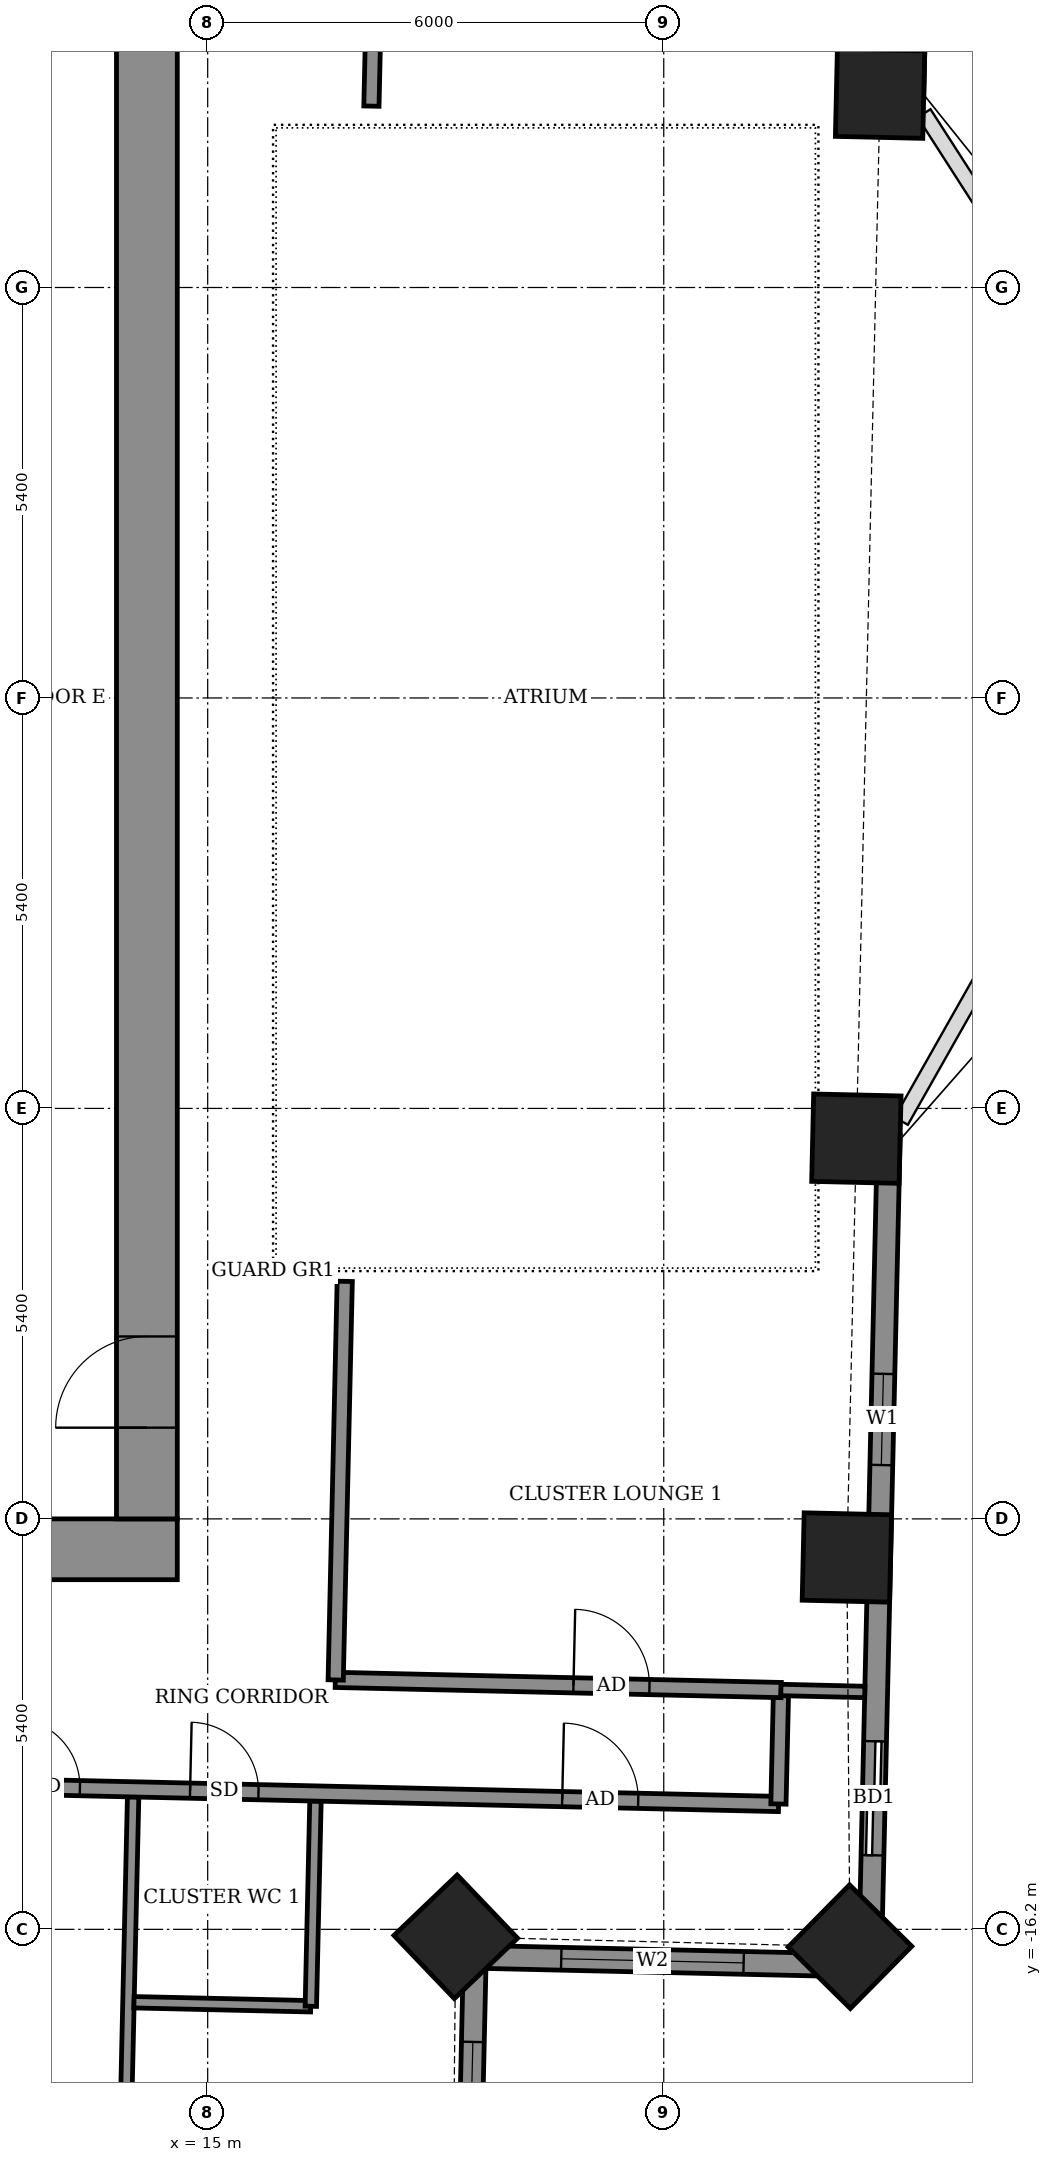
"""IFC4 building model, lengths in metres.
Left out: names, types, materials, properties, quantities, classifications, styles, units other than length and angle.
Written with IfcOpenShell. Run it as: python <this file> out.ifc"""

import sys

from ifc_helpers import new_model, si_unit, direction, frame, frame_2d, origin, origin_2d, place, context, subcontext, project, spatial, rectangle, extrude, element, fill, save


model = new_model("IFC4")
c1 = context("Model", 3, precision=1e-05, world=origin(), true_north=direction((0.0, 1.0)))
c2 = subcontext(c1, "Body", "Model", "MODEL_VIEW")
j1 = project(units=[si_unit("LENGTHUNIT", "METRE"), si_unit("PLANEANGLEUNIT", "RADIAN")], contexts=[c1])
p1 = place(None, origin())
s1 = spatial("IfcSite", under=j1, at=p1, CompositionType="ELEMENT")
p2 = place(p1, origin())
s2 = spatial("IfcBuilding", under=s1, at=p2, CompositionType="ELEMENT")
p3 = place(p2, frame((0.0, 0.0, 201.5)))
s3 = spatial("IfcBuildingStorey", under=s2, at=p3, CompositionType="ELEMENT", Elevation=201.5)
for number, where, z_axis, x_axis in (
    (1, (18.264, -16.298, -0.55), (0.0, 0.0, 1.0), (0.723, 0.691, 0.0)),
    (2, (23.45, -16.428, -0.55), (0.0, 0.0, 1.0), (0.702, 0.712, 0.0)),
    (3, (23.409, -11.308, -0.55), (0.0, 0.0, 1.0), (0.023, 1.0, 0.0)),
    (4, (23.534, -5.798, -0.55), (0.0, 0.0, 1.0), (0.023, 1.0, 0.0)),
    (5, (23.846, 7.95, -0.55), (0.0, 0.0, 1.0), (0.023, 1.0, 0.0)),
):
    element("IfcColumn", number, at=place(p3, frame(where, z_axis=z_axis, x_axis=x_axis)), inside=s3, PredefinedType="COLUMN", context=c2, shape_type="SweptSolid", body=[
        extrude(rectangle(XDim=1.15, YDim=1.15, at=origin_2d()), origin(), (0.0, 0.0, 1.0), 3.6),
    ])
p4 = place(p3, frame((23.713, -16.679, 0.0), z_axis=(0.0, 0.0, 1.0), x_axis=(0.02269451316, 0.999742446369, 0.0)))
e6 = element("IfcWall", 6, at=p4, inside=s3, PredefinedType="SOLIDWALL", context=c2, shape_type="SweptSolid", body=[
    extrude(rectangle(XDim=10.93, YDim=0.3, at=frame_2d((5.465, 0.0))), origin(), (0.0, 0.0, 1.0), 2.55),
])
p5 = place(p4, frame((1.454, 0.0, 0.0)))
e7 = element("IfcOpeningElement", 7, at=p5, cuts=e6, PredefinedType="OPENING", context=c2, shape_type="SweptSolid", body=[
    extrude(rectangle(XDim=1.5, YDim=2.4, at=frame_2d((0.75, 1.2))), frame((0.0, 0.16, 0.0), z_axis=(0.0, -1.0, 0.0), x_axis=(1.0, 0.0, 0.0)), (0.0, 0.0, 1.0), 0.32),
])
p6 = place(p4, frame((6.589, 0.0, 0.9)))
e8 = element("IfcOpeningElement", 8, at=p6, cuts=e6, PredefinedType="OPENING", context=c2, shape_type="SweptSolid", body=[
    extrude(rectangle(XDim=1.2, YDim=1.5, at=frame_2d((0.6, 0.75))), frame((0.0, 0.16, 0.0), z_axis=(0.0, -1.0, 0.0), x_axis=(1.0, 0.0, 0.0)), (0.0, 0.0, 1.0), 0.32),
])
p7 = place(p3, frame((24.27, 7.885, 0.0), z_axis=(0.0, 0.0, 1.0), x_axis=(0.022715362207, 0.999741972871, 0.0)))
e9 = element("IfcWall", 9, at=p7, inside=s3, PredefinedType="SOLIDWALL", context=c2, shape_type="SweptSolid", body=[
    extrude(rectangle(XDim=11.93, YDim=0.3, at=frame_2d((5.965, 0.0))), origin(), (0.0, 0.0, 1.0), 3.05),
])
p8 = place(p7, frame((2.311, 0.0, 0.0)))
e10 = element("IfcOpeningElement", 10, at=p8, cuts=e9, PredefinedType="OPENING", context=c2, shape_type="SweptSolid", body=[
    extrude(rectangle(XDim=1.5, YDim=2.4, at=frame_2d((0.75, 1.2))), frame((0.0, 0.16, 0.0), z_axis=(0.0, -1.0, 0.0), x_axis=(1.0, 0.0, 0.0)), (0.0, 0.0, 1.0), 0.32),
])
p9 = place(p7, frame((7.703, 0.0, 0.9)))
e11 = element("IfcOpeningElement", 11, at=p9, cuts=e9, PredefinedType="OPENING", context=c2, shape_type="SweptSolid", body=[
    extrude(rectangle(XDim=0.9, YDim=1.5, at=frame_2d((0.45, 0.75))), frame((0.0, 0.16, 0.0), z_axis=(0.0, -1.0, 0.0), x_axis=(1.0, 0.0, 0.0)), (0.0, 0.0, 1.0), 0.32),
])
p10 = place(p7, frame((9.426, 0.0, 0.9)))
e12 = element("IfcOpeningElement", 12, at=p10, cuts=e9, PredefinedType="OPENING", context=c2, shape_type="SweptSolid", body=[
    extrude(rectangle(XDim=1.2, YDim=1.5, at=frame_2d((0.6, 0.75))), frame((0.0, 0.16, 0.0), z_axis=(0.0, -1.0, 0.0), x_axis=(1.0, 0.0, 0.0)), (0.0, 0.0, 1.0), 0.32),
])
p11 = place(p3, frame((18.396, -21.76, 0.0), z_axis=(0.0, 0.0, 1.0), x_axis=(0.022675548694, 0.99974287669, 0.0)))
e13 = element("IfcWall", 13, at=p11, inside=s3, PredefinedType="SOLIDWALL", context=c2, shape_type="SweptSolid", body=[
    extrude(rectangle(XDim=5.2, YDim=0.3, at=frame_2d((2.6, 0.0))), origin(), (0.0, 0.0, 1.0), 2.55),
])
p12 = place(p11, frame((1.68, 0.0, 0.9)))
e14 = element("IfcOpeningElement", 14, at=p12, cuts=e13, PredefinedType="OPENING", context=c2, shape_type="SweptSolid", body=[
    extrude(rectangle(XDim=2.4, YDim=1.5, at=frame_2d((1.2, 0.75))), frame((0.0, 0.16, 0.0), z_axis=(0.0, -1.0, 0.0), x_axis=(1.0, 0.0, 0.0)), (0.0, 0.0, 1.0), 0.32),
])
p13 = place(p3, frame((18.514, -16.561, 0.0), z_axis=(0.0, 0.0, 1.0), x_axis=(0.99974287669, -0.022675548694, 0.0)))
e15 = element("IfcWall", 15, at=p13, inside=s3, PredefinedType="SOLIDWALL", context=c2, shape_type="SweptSolid", body=[
    extrude(rectangle(XDim=5.2, YDim=0.3, at=frame_2d((2.6, 0.0))), origin(), (0.0, 0.0, 1.0), 2.55),
])
p14 = place(p13, frame((1.138, 0.0, 0.9)))
e16 = element("IfcOpeningElement", 16, at=p14, cuts=e15, PredefinedType="OPENING", context=c2, shape_type="SweptSolid", body=[
    extrude(rectangle(XDim=2.4, YDim=1.5, at=frame_2d((1.2, 0.75))), frame((0.0, 0.16, 0.0), z_axis=(0.0, -1.0, 0.0), x_axis=(1.0, 0.0, 0.0)), (0.0, 0.0, 1.0), 0.32),
])
p15 = place(p3, frame((13.859, -21.507, 0.0), z_axis=(0.0, 0.0, 1.0), x_axis=(0.022714326521, 0.999741996402, 0.0)))
e17 = element("IfcWall", 17, at=p15, inside=s3, PredefinedType="PARTITIONING", context=c2, shape_type="SweptSolid", body=[
    extrude(rectangle(XDim=7.051, YDim=0.15, at=frame_2d((3.525, 0.0))), origin(), (0.0, 0.0, 1.0), 2.55),
])
p16 = place(p3, frame((14.03, -17.159, 0.0), z_axis=(0.0, 0.0, 1.0), x_axis=(0.999740478815, -0.022781023197, 0.0)))
e18 = element("IfcWall", 18, at=p16, inside=s3, PredefinedType="PARTITIONING", context=c2, shape_type="SweptSolid", body=[
    extrude(rectangle(XDim=2.325, YDim=0.15, at=frame_2d((1.163, 0.0))), origin(), (0.0, 0.0, 1.0), 3.05),
])
p17 = place(p3, frame((16.357, -17.212, 0.0), z_axis=(0.0, 0.0, 1.0), x_axis=(0.02260842146, 0.999744396973, 0.0)))
e19 = element("IfcWall", 19, at=p17, inside=s3, PredefinedType="PARTITIONING", context=c2, shape_type="SweptSolid", body=[
    extrude(rectangle(XDim=2.7, YDim=0.15, at=frame_2d((1.35, 0.0))), origin(), (0.0, 0.0, 1.0), 3.05),
])
p18 = place(p3, frame((-26.421, -13.441, 0.0), z_axis=(0.0, 0.0, 1.0), x_axis=(0.999742754064, -0.022680954485, 0.0)))
e20 = element("IfcWall", 20, at=p18, inside=s3, PredefinedType="PARTITIONING", context=c2, shape_type="SweptSolid", body=[
    extrude(rectangle(XDim=48.945, YDim=0.2, at=frame_2d((24.472, 0.0))), origin(), (0.0, 0.0, 1.0), 3.05),
])
p19 = place(p18, frame((1.375, 0.0, 0.0)))
e21 = element("IfcOpeningElement", 21, at=p19, cuts=e20, PredefinedType="OPENING", context=c2, shape_type="SweptSolid", body=[
    extrude(rectangle(XDim=1.0, YDim=2.1, at=frame_2d((0.5, 1.05))), frame((0.0, 0.11, 0.0), z_axis=(0.0, -1.0, 0.0), x_axis=(1.0, 0.0, 0.0)), (0.0, 0.0, 1.0), 0.22),
])
p20 = place(p18, frame((6.0, 0.0, 0.0)))
e22 = element("IfcOpeningElement", 22, at=p20, cuts=e20, PredefinedType="OPENING", context=c2, shape_type="SweptSolid", body=[
    extrude(rectangle(XDim=0.9, YDim=2.1, at=frame_2d((0.45, 1.05))), frame((0.0, 0.11, 0.0), z_axis=(0.0, -1.0, 0.0), x_axis=(1.0, 0.0, 0.0)), (0.0, 0.0, 1.0), 0.22),
])
p21 = place(p18, frame((10.775, 0.0, 0.0)))
e23 = element("IfcOpeningElement", 23, at=p21, cuts=e20, PredefinedType="OPENING", context=c2, shape_type="SweptSolid", body=[
    extrude(rectangle(XDim=0.9, YDim=2.1, at=frame_2d((0.45, 1.05))), frame((0.0, 0.11, 0.0), z_axis=(0.0, -1.0, 0.0), x_axis=(1.0, 0.0, 0.0)), (0.0, 0.0, 1.0), 0.22),
])
p22 = place(p18, frame((13.05, 0.0, 0.0)))
e24 = element("IfcOpeningElement", 24, at=p22, cuts=e20, PredefinedType="OPENING", context=c2, shape_type="SweptSolid", body=[
    extrude(rectangle(XDim=0.9, YDim=2.1, at=frame_2d((0.45, 1.05))), frame((0.0, 0.11, 0.0), z_axis=(0.0, -1.0, 0.0), x_axis=(1.0, 0.0, 0.0)), (0.0, 0.0, 1.0), 0.22),
])
p23 = place(p18, frame((20.275, 0.0, 0.0)))
e25 = element("IfcOpeningElement", 25, at=p23, cuts=e20, PredefinedType="OPENING", context=c2, shape_type="SweptSolid", body=[
    extrude(rectangle(XDim=0.9, YDim=2.1, at=frame_2d((0.45, 1.05))), frame((0.0, 0.11, 0.0), z_axis=(0.0, -1.0, 0.0), x_axis=(1.0, 0.0, 0.0)), (0.0, 0.0, 1.0), 0.22),
])
p24 = place(p18, frame((22.525, 0.0, 0.0)))
e26 = element("IfcOpeningElement", 26, at=p24, cuts=e20, PredefinedType="OPENING", context=c2, shape_type="SweptSolid", body=[
    extrude(rectangle(XDim=0.9, YDim=2.1, at=frame_2d((0.45, 1.05))), frame((0.0, 0.11, 0.0), z_axis=(0.0, -1.0, 0.0), x_axis=(1.0, 0.0, 0.0)), (0.0, 0.0, 1.0), 0.22),
])
p25 = place(p18, frame((29.6, 0.0, 0.0)))
e27 = element("IfcOpeningElement", 27, at=p25, cuts=e20, PredefinedType="OPENING", context=c2, shape_type="SweptSolid", body=[
    extrude(rectangle(XDim=0.9, YDim=2.1, at=frame_2d((0.45, 1.05))), frame((0.0, 0.11, 0.0), z_axis=(0.0, -1.0, 0.0), x_axis=(1.0, 0.0, 0.0)), (0.0, 0.0, 1.0), 0.22),
])
p26 = place(p18, frame((31.875, 0.0, 0.0)))
e28 = element("IfcOpeningElement", 28, at=p26, cuts=e20, PredefinedType="OPENING", context=c2, shape_type="SweptSolid", body=[
    extrude(rectangle(XDim=0.9, YDim=2.1, at=frame_2d((0.45, 1.05))), frame((0.0, 0.11, 0.0), z_axis=(0.0, -1.0, 0.0), x_axis=(1.0, 0.0, 0.0)), (0.0, 0.0, 1.0), 0.22),
])
p27 = place(p18, frame((38.85, 0.0, 0.0)))
e29 = element("IfcOpeningElement", 29, at=p27, cuts=e20, PredefinedType="OPENING", context=c2, shape_type="SweptSolid", body=[
    extrude(rectangle(XDim=0.9, YDim=2.1, at=frame_2d((0.45, 1.05))), frame((0.0, 0.11, 0.0), z_axis=(0.0, -1.0, 0.0), x_axis=(1.0, 0.0, 0.0)), (0.0, 0.0, 1.0), 0.22),
])
p28 = place(p18, frame((46.097, 0.0, 0.0)))
e30 = element("IfcOpeningElement", 30, at=p28, cuts=e20, PredefinedType="OPENING", context=c2, shape_type="SweptSolid", body=[
    extrude(rectangle(XDim=1.0, YDim=2.1, at=frame_2d((0.5, 1.05))), frame((0.0, 0.11, 0.0), z_axis=(0.0, -1.0, 0.0), x_axis=(1.0, 0.0, 0.0)), (0.0, 0.0, 1.0), 0.22),
])
p29 = place(p18, frame((41.2, 0.0, 0.0)))
e31 = element("IfcOpeningElement", 31, at=p29, cuts=e20, PredefinedType="OPENING", context=c2, shape_type="SweptSolid", body=[
    extrude(rectangle(XDim=0.9, YDim=2.1, at=frame_2d((0.45, 1.05))), frame((0.0, 0.11, 0.0), z_axis=(0.0, -1.0, 0.0), x_axis=(1.0, 0.0, 0.0)), (0.0, 0.0, 1.0), 0.22),
])
p30 = place(p3, frame((22.509, -14.551, 0.0), z_axis=(0.0, 0.0, 1.0), x_axis=(0.022632637625, 0.99974384905, 0.0)))
e32 = element("IfcWall", 32, at=p30, inside=s3, PredefinedType="PARTITIONING", context=c2, shape_type="SweptSolid", body=[
    extrude(rectangle(XDim=1.5, YDim=0.2, at=frame_2d((0.75, 0.0))), origin(), (0.0, 0.0, 1.0), 3.05),
])
p31 = place(p3, frame((16.679, -12.918, 0.0), z_axis=(0.0, 0.0, 1.0), x_axis=(0.999739057042, -0.022843332181, 0.0)))
e33 = element("IfcWall", 33, at=p31, inside=s3, PredefinedType="PARTITIONING", context=c2, shape_type="SweptSolid", body=[
    extrude(rectangle(XDim=5.867, YDim=0.2, at=frame_2d((2.934, 0.0))), origin(), (0.0, 0.0, 1.0), 3.05),
])
p32 = place(p31, frame((3.134, 0.0, 0.0)))
e34 = element("IfcOpeningElement", 34, at=p32, cuts=e33, PredefinedType="OPENING", context=c2, shape_type="SweptSolid", body=[
    extrude(rectangle(XDim=1.0, YDim=2.1, at=frame_2d((0.5, 1.05))), frame((0.0, 0.11, 0.0), z_axis=(0.0, -1.0, 0.0), x_axis=(1.0, 0.0, 0.0)), (0.0, 0.0, 1.0), 0.22),
])
p33 = place(p3, frame((16.684, -12.919, 0.0), z_axis=(0.0, 0.0, 1.0), x_axis=(0.022667483124, 0.999743059595, 0.0)))
e35 = element("IfcWall", 35, at=p33, inside=s3, PredefinedType="PARTITIONING", context=c2, shape_type="SweptSolid", body=[
    extrude(rectangle(XDim=5.245, YDim=0.2, at=frame_2d((2.623, 0.0))), origin(), (0.0, 0.0, 1.0), 3.05),
])
p34 = place(p3, frame((22.541, -13.051, 0.0), z_axis=(0.0, 0.0, 1.0), x_axis=(0.999725373977, -0.023434517833, 0.0)))
e36 = element("IfcWall", 36, at=p34, inside=s3, PredefinedType="PARTITIONING", context=c2, shape_type="SweptSolid", body=[
    extrude(rectangle(XDim=1.104, YDim=0.15, at=frame_2d((0.552, 0.0))), origin(), (0.0, 0.0, 1.0), 2.55),
])
p35 = place(p3, frame((17.154, 7.786, 0.0), z_axis=(0.0, 0.0, 1.0), x_axis=(0.022680883318, 0.999742755679, 0.0)))
e37 = element("IfcWall", 37, at=p35, inside=s3, PredefinedType="PARTITIONING", context=c2, shape_type="SweptSolid", body=[
    extrude(rectangle(XDim=7.664, YDim=0.2, at=frame_2d((3.832, 0.0))), origin(), (0.0, 0.0, 1.0), 3.05),
])
p36 = place(p35, frame((3.434, 0.0, 0.0)))
e38 = element("IfcOpeningElement", 38, at=p36, cuts=e37, PredefinedType="OPENING", context=c2, shape_type="SweptSolid", body=[
    extrude(rectangle(XDim=1.0, YDim=2.1, at=frame_2d((0.5, 1.05))), frame((0.0, 0.11, 0.0), z_axis=(0.0, -1.0, 0.0), x_axis=(1.0, 0.0, 0.0)), (0.0, 0.0, 1.0), 0.22),
])
p37 = place(p3, frame((-14.6, -11.2, 0.0), z_axis=(0.0, 0.0, 1.0), x_axis=(1.0, 0.0, 0.0)))
e39 = element("IfcWall", 39, at=p37, inside=s3, PredefinedType="SHEAR", context=c2, shape_type="SweptSolid", body=[
    extrude(rectangle(XDim=29.2, YDim=0.8, at=frame_2d((14.6, 0.0))), origin(), (0.0, 0.0, 1.0), 3.6),
])
p38 = place(p3, frame((14.2, -10.8, 0.0), z_axis=(0.0, 0.0, 1.0), x_axis=(0.0, 1.0, 0.0)))
e40 = element("IfcWall", 40, at=p38, inside=s3, PredefinedType="SHEAR", context=c2, shape_type="SweptSolid", body=[
    extrude(rectangle(XDim=21.6, YDim=0.8, at=frame_2d((10.8, 0.0))), origin(), (0.0, 0.0, 1.0), 3.6),
])
p39 = place(p38, frame((1.2, 0.0, 0.0)))
e41 = element("IfcOpeningElement", 41, at=p39, cuts=e40, PredefinedType="OPENING", context=c2, shape_type="SweptSolid", body=[
    extrude(rectangle(XDim=1.2, YDim=2.1, at=frame_2d((0.6, 1.05))), frame((0.0, 0.41, 0.0), z_axis=(0.0, -1.0, 0.0), x_axis=(1.0, 0.0, 0.0)), (0.0, 0.0, 1.0), 0.82),
])
p40 = place(p5, origin())
e42 = element("IfcDoor", 42, at=p40, inside=s3, OperationType="SLIDING_TO_LEFT", PredefinedType="DOOR", context=c2, shape_type="SweptSolid", body=[
    extrude(rectangle(XDim=1.5, YDim=2.4, at=frame_2d((0.75, 1.2))), frame((0.0, 0.025, 0.0), z_axis=(0.0, -1.0, 0.0), x_axis=(1.0, 0.0, 0.0)), (0.0, 0.0, 1.0), 0.05),
])
fill(e7, e42)
p41 = place(p6, origin())
e43 = element("IfcWindow", 43, at=p41, inside=s3, PartitioningType="SINGLE_PANEL", PredefinedType="WINDOW", context=c2, shape_type="SweptSolid", body=[
    extrude(rectangle(XDim=1.2, YDim=1.5, at=frame_2d((0.6, 0.75))), frame((0.0, 0.03, 0.0), z_axis=(0.0, -1.0, 0.0), x_axis=(1.0, 0.0, 0.0)), (0.0, 0.0, 1.0), 0.06),
])
fill(e8, e43)
p42 = place(p12, origin())
e44 = element("IfcWindow", 44, at=p42, inside=s3, PartitioningType="DOUBLE_PANEL_VERTICAL", PredefinedType="WINDOW", context=c2, shape_type="SweptSolid", body=[
    extrude(rectangle(XDim=2.4, YDim=1.5, at=frame_2d((1.2, 0.75))), frame((0.0, 0.03, 0.0), z_axis=(0.0, -1.0, 0.0), x_axis=(1.0, 0.0, 0.0)), (0.0, 0.0, 1.0), 0.06),
])
fill(e14, e44)
p43 = place(p14, origin())
e45 = element("IfcWindow", 45, at=p43, inside=s3, PartitioningType="DOUBLE_PANEL_VERTICAL", PredefinedType="WINDOW", context=c2, shape_type="SweptSolid", body=[
    extrude(rectangle(XDim=2.4, YDim=1.5, at=frame_2d((1.2, 0.75))), frame((0.0, 0.03, 0.0), z_axis=(0.0, -1.0, 0.0), x_axis=(1.0, 0.0, 0.0)), (0.0, 0.0, 1.0), 0.06),
])
fill(e16, e45)
p44 = place(p27, origin())
e46 = element("IfcDoor", 46, at=p44, inside=s3, OperationType="SINGLE_SWING_LEFT", PredefinedType="DOOR", context=c2, shape_type="SweptSolid", body=[
    extrude(rectangle(XDim=0.9, YDim=2.1, at=frame_2d((0.45, 1.05))), frame((0.0, 0.025, 0.0), z_axis=(0.0, -1.0, 0.0), x_axis=(1.0, 0.0, 0.0)), (0.0, 0.0, 1.0), 0.05),
])
fill(e29, e46)
p45 = place(p28, origin())
e47 = element("IfcDoor", 47, at=p45, inside=s3, OperationType="SINGLE_SWING_RIGHT", PredefinedType="DOOR", context=c2, shape_type="SweptSolid", body=[
    extrude(rectangle(XDim=1.0, YDim=2.1, at=frame_2d((0.5, 1.05))), frame((0.0, 0.025, 0.0), z_axis=(0.0, -1.0, 0.0), x_axis=(1.0, 0.0, 0.0)), (0.0, 0.0, 1.0), 0.05),
])
fill(e30, e47)
p46 = place(p29, origin())
e48 = element("IfcDoor", 48, at=p46, inside=s3, OperationType="SINGLE_SWING_RIGHT", PredefinedType="DOOR", context=c2, shape_type="SweptSolid", body=[
    extrude(rectangle(XDim=0.9, YDim=2.1, at=frame_2d((0.45, 1.05))), frame((0.0, 0.025, 0.0), z_axis=(0.0, -1.0, 0.0), x_axis=(1.0, 0.0, 0.0)), (0.0, 0.0, 1.0), 0.05),
])
fill(e31, e48)
p47 = place(p32, origin())
e49 = element("IfcDoor", 49, at=p47, inside=s3, OperationType="SINGLE_SWING_LEFT", PredefinedType="DOOR", context=c2, shape_type="SweptSolid", body=[
    extrude(rectangle(XDim=1.0, YDim=2.1, at=frame_2d((0.5, 1.05))), frame((0.0, 0.025, 0.0), z_axis=(0.0, -1.0, 0.0), x_axis=(1.0, 0.0, 0.0)), (0.0, 0.0, 1.0), 0.05),
])
fill(e34, e49)
p48 = place(p39, origin())
e50 = element("IfcDoor", 50, at=p48, inside=s3, OperationType="DOUBLE_DOOR_SINGLE_SWING", PredefinedType="DOOR", context=c2, shape_type="SweptSolid", body=[
    extrude(rectangle(XDim=1.2, YDim=2.1, at=frame_2d((0.6, 1.05))), frame((0.0, 0.025, 0.0), z_axis=(0.0, -1.0, 0.0), x_axis=(1.0, 0.0, 0.0)), (0.0, 0.0, 1.0), 0.05),
])
fill(e41, e50)
save(model, sys.argv[1])
